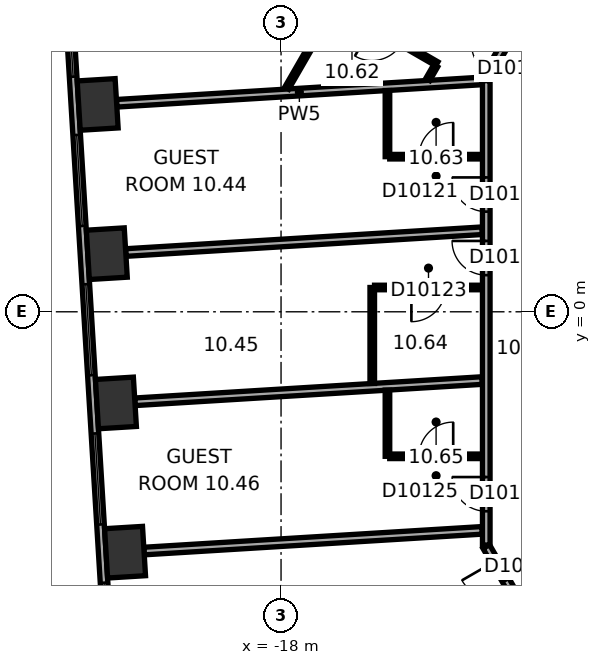
"""IFC4 building model, lengths in metres.
Left out: names, types, materials, properties, quantities, classifications, styles, units other than length and angle.
Written with IfcOpenShell. Run it as: python <this file> out.ifc"""

import sys

from ifc_helpers import new_model, si_unit, direction, frame, frame_2d, origin, origin_2d, place, context, subcontext, project, spatial, rectangle, extrude, element, fill, save


model = new_model("IFC4")
c1 = context("Model", 3, precision=1e-05, world=origin(), true_north=direction((0.0, 1.0)))
c2 = subcontext(c1, "Body", "Model", "MODEL_VIEW")
j1 = project(units=[si_unit("LENGTHUNIT", "METRE"), si_unit("PLANEANGLEUNIT", "RADIAN")], contexts=[c1])
p1 = place(None, origin())
s1 = spatial("IfcSite", under=j1, at=p1, CompositionType="ELEMENT")
p2 = place(p1, origin())
s2 = spatial("IfcBuilding", under=s1, at=p2, CompositionType="ELEMENT")
p3 = place(p2, frame((0.0, 0.0, 53.9)))
s3 = spatial("IfcBuildingStorey", under=s2, at=p3, CompositionType="ELEMENT", Elevation=53.9)
for number, where, z_axis, x_axis in (
    (1, (-22.826, 5.456, 0.0), (0.0, 0.0, 1.0), (0.061, -0.998, 0.0)),
    (2, (-22.585, 1.529, 0.0), (0.0, 0.0, 1.0), (0.061, -0.998, 0.0)),
    (3, (-22.345, -2.399, 0.0), (0.0, 0.0, 1.0), (0.061, -0.998, 0.0)),
    (4, (-22.105, -6.326, 0.0), (0.0, 0.0, 1.0), (0.061, -0.998, 0.0)),
):
    element("IfcColumn", number, at=place(p3, frame(where, z_axis=z_axis, x_axis=x_axis)), inside=s3, PredefinedType="COLUMN", context=c2, shape_type="SweptSolid", body=[
        extrude(rectangle(XDim=1.3, YDim=1.0, at=origin_2d()), origin(), (0.0, 0.0, 1.0), 3.3),
    ])
p4 = place(p3, frame((-23.713, 10.131, 0.0), z_axis=(0.0, 0.0, 1.0), x_axis=(0.061040439785, -0.998135293791, 0.0)))
e5 = element("IfcWall", 5, at=p4, inside=s3, PredefinedType="STANDARD", context=c2, shape_type="SweptSolid", body=[
    extrude(rectangle(XDim=21.246, YDim=0.2, at=frame_2d((10.623, 0.0))), origin(), (0.0, 0.0, 1.0), 3.3),
])
p5 = place(p4, frame((1.553, 0.0, 0.8)))
e6 = element("IfcOpeningElement", 6, at=p5, cuts=e5, PredefinedType="OPENING", context=c2, shape_type="SweptSolid", body=[
    extrude(rectangle(XDim=2.4, YDim=1.7, at=frame_2d((1.2, 0.85))), frame((0.0, 0.11, 0.0), z_axis=(0.0, -1.0, 0.0), x_axis=(1.0, 0.0, 0.0)), (0.0, 0.0, 1.0), 0.22),
])
p6 = place(p4, frame((5.488, 0.0, 0.8)))
e7 = element("IfcOpeningElement", 7, at=p6, cuts=e5, PredefinedType="OPENING", context=c2, shape_type="SweptSolid", body=[
    extrude(rectangle(XDim=2.4, YDim=1.7, at=frame_2d((1.2, 0.85))), frame((0.0, 0.11, 0.0), z_axis=(0.0, -1.0, 0.0), x_axis=(1.0, 0.0, 0.0)), (0.0, 0.0, 1.0), 0.22),
])
p7 = place(p4, frame((9.422, 0.0, 0.8)))
e8 = element("IfcOpeningElement", 8, at=p7, cuts=e5, PredefinedType="OPENING", context=c2, shape_type="SweptSolid", body=[
    extrude(rectangle(XDim=2.4, YDim=1.7, at=frame_2d((1.2, 0.85))), frame((0.0, 0.11, 0.0), z_axis=(0.0, -1.0, 0.0), x_axis=(1.0, 0.0, 0.0)), (0.0, 0.0, 1.0), 0.22),
])
p8 = place(p4, frame((13.357, 0.0, 0.8)))
e9 = element("IfcOpeningElement", 9, at=p8, cuts=e5, PredefinedType="OPENING", context=c2, shape_type="SweptSolid", body=[
    extrude(rectangle(XDim=2.4, YDim=1.7, at=frame_2d((1.2, 0.85))), frame((0.0, 0.11, 0.0), z_axis=(0.0, -1.0, 0.0), x_axis=(1.0, 0.0, 0.0)), (0.0, 0.0, 1.0), 0.22),
])
p9 = place(p4, frame((17.292, 0.0, 0.8)))
e10 = element("IfcOpeningElement", 10, at=p9, cuts=e5, PredefinedType="OPENING", context=c2, shape_type="SweptSolid", body=[
    extrude(rectangle(XDim=2.4, YDim=1.7, at=frame_2d((1.2, 0.85))), frame((0.0, 0.11, 0.0), z_axis=(0.0, -1.0, 0.0), x_axis=(1.0, 0.0, 0.0)), (0.0, 0.0, 1.0), 0.22),
])
p10 = place(p3, frame((-22.327, 5.486, 0.0), z_axis=(0.0, 0.0, 1.0), x_axis=(0.998135194863, 0.061042057435, 0.0)))
e11 = element("IfcWall", 11, at=p10, inside=s3, PredefinedType="PARTITIONING", context=c2, shape_type="SweptSolid", body=[
    extrude(rectangle(XDim=9.635, YDim=0.2, at=frame_2d((4.817, 0.0))), origin(), (0.0, 0.0, 1.0), 3.05),
])
p11 = place(p3, frame((-22.086, 1.559, 0.0), z_axis=(0.0, 0.0, 1.0), x_axis=(0.99813491363, 0.061046655873, 0.0)))
e12 = element("IfcWall", 12, at=p11, inside=s3, PredefinedType="PARTITIONING", context=c2, shape_type="SweptSolid", body=[
    extrude(rectangle(XDim=9.394, YDim=0.2, at=frame_2d((4.697, 0.0))), origin(), (0.0, 0.0, 1.0), 2.6),
])
p12 = place(p3, frame((-21.846, -2.368, 0.0), z_axis=(0.0, 0.0, 1.0), x_axis=(0.998134617584, 0.061051496129, 0.0)))
e13 = element("IfcWall", 13, at=p12, inside=s3, PredefinedType="PARTITIONING", context=c2, shape_type="SweptSolid", body=[
    extrude(rectangle(XDim=9.154, YDim=0.2, at=frame_2d((4.577, 0.0))), origin(), (0.0, 0.0, 1.0), 3.05),
])
p13 = place(p3, frame((-21.606, -6.295, 0.0), z_axis=(0.0, 0.0, 1.0), x_axis=(0.998134305525, 0.061056597794, 0.0)))
e14 = element("IfcWall", 14, at=p13, inside=s3, PredefinedType="PARTITIONING", context=c2, shape_type="SweptSolid", body=[
    extrude(rectangle(XDim=8.913, YDim=0.2, at=frame_2d((4.457, 0.0))), origin(), (0.0, 0.0, 1.0), 2.6),
])
p14 = place(p3, frame((-17.849, 5.885, 0.0), z_axis=(0.0, 0.0, 1.0), x_axis=(0.500034589094, 0.866005432841, 0.0)))
e15 = element("IfcWall", 15, at=p14, inside=s3, PredefinedType="PARTITIONING", context=c2, shape_type="SweptSolid", body=[
    extrude(rectangle(XDim=2.528, YDim=0.12, at=frame_2d((1.264, 0.0))), origin(), (0.0, 0.0, 1.0), 3.05),
])
p15 = place(p3, frame((-16.533, 8.044, 0.0), z_axis=(0.0, 0.0, 1.0), x_axis=(0.86601037836, -0.500026023896, 0.0)))
e16 = element("IfcWall", 16, at=p15, inside=s3, PredefinedType="PARTITIONING", context=c2, shape_type="SweptSolid", body=[
    extrude(rectangle(XDim=3.04, YDim=0.12, at=frame_2d((1.52, 0.0))), origin(), (0.0, 0.0, 1.0), 3.05),
])
p16 = place(p15, frame((1.07, 0.0, 0.0)))
e17 = element("IfcOpeningElement", 17, at=p16, cuts=e16, PredefinedType="OPENING", context=c2, shape_type="SweptSolid", body=[
    extrude(rectangle(XDim=0.9, YDim=2.1, at=frame_2d((0.45, 1.05))), frame((0.0, 0.07, 0.0), z_axis=(0.0, -1.0, 0.0), x_axis=(1.0, 0.0, 0.0)), (0.0, 0.0, 1.0), 0.14),
])
p17 = place(p3, frame((-15.6, -1.886, 0.0), z_axis=(0.0, 0.0, 1.0), x_axis=(0.0, 1.0, 0.0)))
e18 = element("IfcWall", 18, at=p17, inside=s3, PredefinedType="PARTITIONING", context=c2, shape_type="SweptSolid", body=[
    extrude(rectangle(XDim=2.525, YDim=0.12, at=frame_2d((1.263, 0.0))), origin(), (0.0, 0.0, 1.0), 3.05),
])
p18 = place(p3, frame((-15.54, 0.639, 0.0), z_axis=(0.0, 0.0, 1.0), x_axis=(1.0, 0.0, 0.0)))
e19 = element("IfcWall", 19, at=p18, inside=s3, PredefinedType="PARTITIONING", context=c2, shape_type="SweptSolid", body=[
    extrude(rectangle(XDim=2.84, YDim=0.12, at=frame_2d((1.42, 0.0))), origin(), (0.0, 0.0, 1.0), 2.6),
])
p19 = place(p18, frame((0.97, 0.0, 0.0)))
e20 = element("IfcOpeningElement", 20, at=p19, cuts=e19, PredefinedType="OPENING", context=c2, shape_type="SweptSolid", body=[
    extrude(rectangle(XDim=0.9, YDim=2.1, at=frame_2d((0.45, 1.05))), frame((0.0, 0.07, 0.0), z_axis=(0.0, -1.0, 0.0), x_axis=(1.0, 0.0, 0.0)), (0.0, 0.0, 1.0), 0.14),
])
for number, where, z_axis, x_axis in (
    (21, (-15.2, -3.803, 0.0), (0.0, 0.0, 1.0), (0.0, 1.0, 0.0)),
    (22, (-15.2, 4.081, 0.0), (0.0, 0.0, 1.0), (0.0, 1.0, 0.0)),
):
    element("IfcWall", number, at=place(p3, frame(where, z_axis=z_axis, x_axis=x_axis)), inside=s3, PredefinedType="PARTITIONING", context=c2, shape_type="SweptSolid", body=[
        extrude(rectangle(XDim=1.741, YDim=0.12, at=frame_2d((0.871, 0.0))), origin(), (0.0, 0.0, 1.0), 3.05),
    ])
p20 = place(p3, frame((-13.931, 6.472, 0.0), z_axis=(0.0, 0.0, 1.0), x_axis=(-0.499739399214, -0.866175809448, 0.0)))
e23 = element("IfcWall", 23, at=p20, inside=s3, PredefinedType="PARTITIONING", context=c2, shape_type="SweptSolid", body=[
    extrude(rectangle(XDim=0.416, YDim=0.12, at=frame_2d((0.208, 0.0))), origin(), (0.0, 0.0, 1.0), 3.05),
])
p21 = place(p3, frame((-12.7, -3.803, 0.0), z_axis=(0.0, 0.0, 1.0), x_axis=(-1.0, 0.0, 0.0)))
e24 = element("IfcWall", 24, at=p21, inside=s3, PredefinedType="PARTITIONING", context=c2, shape_type="SweptSolid", body=[
    extrude(rectangle(XDim=2.44, YDim=0.12, at=frame_2d((1.22, 0.0))), origin(), (0.0, 0.0, 1.0), 3.05),
])
p22 = place(p21, frame((0.77, 0.0, 0.0)))
e25 = element("IfcOpeningElement", 25, at=p22, cuts=e24, PredefinedType="OPENING", context=c2, shape_type="SweptSolid", body=[
    extrude(rectangle(XDim=0.9, YDim=2.1, at=frame_2d((0.45, 1.05))), frame((0.0, 0.07, 0.0), z_axis=(0.0, -1.0, 0.0), x_axis=(1.0, 0.0, 0.0)), (0.0, 0.0, 1.0), 0.14),
])
p23 = place(p3, frame((-12.7, 4.081, 0.0), z_axis=(0.0, 0.0, 1.0), x_axis=(-1.0, 0.0, 0.0)))
e26 = element("IfcWall", 26, at=p23, inside=s3, PredefinedType="PARTITIONING", context=c2, shape_type="SweptSolid", body=[
    extrude(rectangle(XDim=2.44, YDim=0.12, at=frame_2d((1.22, 0.0))), origin(), (0.0, 0.0, 1.0), 3.05),
])
p24 = place(p23, frame((0.77, 0.0, 0.0)))
e27 = element("IfcOpeningElement", 27, at=p24, cuts=e26, PredefinedType="OPENING", context=c2, shape_type="SweptSolid", body=[
    extrude(rectangle(XDim=0.9, YDim=2.1, at=frame_2d((0.45, 1.05))), frame((0.0, 0.07, 0.0), z_axis=(0.0, -1.0, 0.0), x_axis=(1.0, 0.0, 0.0)), (0.0, 0.0, 1.0), 0.14),
])
p25 = place(p3, frame((-12.6, -6.177, 0.0), z_axis=(0.0, 0.0, 1.0), x_axis=(0.500063520245, -0.865988727248, 0.0)))
e28 = element("IfcWall", 28, at=p25, inside=s3, PredefinedType="PARTITIONING", context=c2, shape_type="SweptSolid", body=[
    extrude(rectangle(XDim=1.9, YDim=0.2, at=frame_2d((0.95, 0.0))), origin(), (0.0, 0.0, 1.0), 3.05),
])
p26 = place(p25, frame((0.45, 0.0, 0.0)))
e29 = element("IfcOpeningElement", 29, at=p26, cuts=e28, PredefinedType="OPENING", context=c2, shape_type="SweptSolid", body=[
    extrude(rectangle(XDim=1.0, YDim=2.1, at=frame_2d((0.5, 1.05))), frame((0.0, 0.11, 0.0), z_axis=(0.0, -1.0, 0.0), x_axis=(1.0, 0.0, 0.0)), (0.0, 0.0, 1.0), 0.22),
])
p27 = place(p3, frame((-12.6, 6.081, 0.0), z_axis=(0.0, 0.0, 1.0), x_axis=(0.0, -1.0, 0.0)))
e30 = element("IfcWall", 30, at=p27, inside=s3, PredefinedType="PARTITIONING", context=c2, shape_type="SweptSolid", body=[
    extrude(rectangle(XDim=12.219, YDim=0.2, at=frame_2d((6.109, 0.0))), origin(), (0.0, 0.0, 1.0), 3.05),
])
p28 = place(p27, frame((2.546, 0.0, 0.0)))
e31 = element("IfcOpeningElement", 31, at=p28, cuts=e30, PredefinedType="OPENING", context=c2, shape_type="SweptSolid", body=[
    extrude(rectangle(XDim=0.9, YDim=2.1, at=frame_2d((0.45, 1.05))), frame((0.0, 0.11, 0.0), z_axis=(0.0, -1.0, 0.0), x_axis=(1.0, 0.0, 0.0)), (0.0, 0.0, 1.0), 0.22),
])
p29 = place(p27, frame((4.217, 0.0, 0.0)))
e32 = element("IfcOpeningElement", 32, at=p29, cuts=e30, PredefinedType="OPENING", context=c2, shape_type="SweptSolid", body=[
    extrude(rectangle(XDim=0.9, YDim=2.1, at=frame_2d((0.45, 1.05))), frame((0.0, 0.11, 0.0), z_axis=(0.0, -1.0, 0.0), x_axis=(1.0, 0.0, 0.0)), (0.0, 0.0, 1.0), 0.22),
])
p30 = place(p27, frame((10.43, 0.0, 0.0)))
e33 = element("IfcOpeningElement", 33, at=p30, cuts=e30, PredefinedType="OPENING", context=c2, shape_type="SweptSolid", body=[
    extrude(rectangle(XDim=0.9, YDim=2.1, at=frame_2d((0.45, 1.05))), frame((0.0, 0.11, 0.0), z_axis=(0.0, -1.0, 0.0), x_axis=(1.0, 0.0, 0.0)), (0.0, 0.0, 1.0), 0.22),
])
p31 = place(p3, frame((-11.65, 7.823, 0.0), z_axis=(0.0, 0.0, 1.0), x_axis=(-0.500063520245, -0.865988727248, 0.0)))
e34 = element("IfcWall", 34, at=p31, inside=s3, PredefinedType="PARTITIONING", context=c2, shape_type="SweptSolid", body=[
    extrude(rectangle(XDim=1.9, YDim=0.2, at=frame_2d((0.95, 0.0))), origin(), (0.0, 0.0, 1.0), 3.05),
])
p32 = place(p31, frame((0.882, 0.0, 0.0)))
e35 = element("IfcOpeningElement", 35, at=p32, cuts=e34, PredefinedType="OPENING", context=c2, shape_type="SweptSolid", body=[
    extrude(rectangle(XDim=0.9, YDim=2.1, at=frame_2d((0.45, 1.05))), frame((0.0, 0.11, 0.0), z_axis=(0.0, -1.0, 0.0), x_axis=(1.0, 0.0, 0.0)), (0.0, 0.0, 1.0), 0.22),
])
p33 = place(p5, origin())
e36 = element("IfcWindow", 36, at=p33, inside=s3, PartitioningType="SINGLE_PANEL", PredefinedType="WINDOW", context=c2, shape_type="SweptSolid", body=[
    extrude(rectangle(XDim=2.4, YDim=1.7, at=frame_2d((1.2, 0.85))), frame((0.0, 0.03, 0.0), z_axis=(0.0, -1.0, 0.0), x_axis=(1.0, 0.0, 0.0)), (0.0, 0.0, 1.0), 0.06),
])
fill(e6, e36)
p34 = place(p6, origin())
e37 = element("IfcWindow", 37, at=p34, inside=s3, PartitioningType="SINGLE_PANEL", PredefinedType="WINDOW", context=c2, shape_type="SweptSolid", body=[
    extrude(rectangle(XDim=2.4, YDim=1.7, at=frame_2d((1.2, 0.85))), frame((0.0, 0.03, 0.0), z_axis=(0.0, -1.0, 0.0), x_axis=(1.0, 0.0, 0.0)), (0.0, 0.0, 1.0), 0.06),
])
fill(e7, e37)
p35 = place(p7, origin())
e38 = element("IfcWindow", 38, at=p35, inside=s3, PartitioningType="SINGLE_PANEL", PredefinedType="WINDOW", context=c2, shape_type="SweptSolid", body=[
    extrude(rectangle(XDim=2.4, YDim=1.7, at=frame_2d((1.2, 0.85))), frame((0.0, 0.03, 0.0), z_axis=(0.0, -1.0, 0.0), x_axis=(1.0, 0.0, 0.0)), (0.0, 0.0, 1.0), 0.06),
])
fill(e8, e38)
p36 = place(p8, origin())
e39 = element("IfcWindow", 39, at=p36, inside=s3, PartitioningType="SINGLE_PANEL", PredefinedType="WINDOW", context=c2, shape_type="SweptSolid", body=[
    extrude(rectangle(XDim=2.4, YDim=1.7, at=frame_2d((1.2, 0.85))), frame((0.0, 0.03, 0.0), z_axis=(0.0, -1.0, 0.0), x_axis=(1.0, 0.0, 0.0)), (0.0, 0.0, 1.0), 0.06),
])
fill(e9, e39)
p37 = place(p9, origin())
e40 = element("IfcWindow", 40, at=p37, inside=s3, PartitioningType="SINGLE_PANEL", PredefinedType="WINDOW", context=c2, shape_type="SweptSolid", body=[
    extrude(rectangle(XDim=2.4, YDim=1.7, at=frame_2d((1.2, 0.85))), frame((0.0, 0.03, 0.0), z_axis=(0.0, -1.0, 0.0), x_axis=(1.0, 0.0, 0.0)), (0.0, 0.0, 1.0), 0.06),
])
fill(e10, e40)
p38 = place(p32, origin())
e41 = element("IfcDoor", 41, at=p38, inside=s3, OperationType="SINGLE_SWING_LEFT", PredefinedType="DOOR", context=c2, shape_type="SweptSolid", body=[
    extrude(rectangle(XDim=0.9, YDim=2.1, at=frame_2d((0.45, 1.05))), frame((0.0, 0.025, 0.0), z_axis=(0.0, -1.0, 0.0), x_axis=(1.0, 0.0, 0.0)), (0.0, 0.0, 1.0), 0.05),
])
fill(e35, e41)
p39 = place(p28, origin())
e42 = element("IfcDoor", 42, at=p39, inside=s3, OperationType="SINGLE_SWING_LEFT", PredefinedType="DOOR", context=c2, shape_type="SweptSolid", body=[
    extrude(rectangle(XDim=0.9, YDim=2.1, at=frame_2d((0.45, 1.05))), frame((0.0, 0.025, 0.0), z_axis=(0.0, -1.0, 0.0), x_axis=(1.0, 0.0, 0.0)), (0.0, 0.0, 1.0), 0.05),
])
fill(e31, e42)
p40 = place(p24, origin())
e43 = element("IfcDoor", 43, at=p40, inside=s3, OperationType="SINGLE_SWING_LEFT", PredefinedType="DOOR", context=c2, shape_type="SweptSolid", body=[
    extrude(rectangle(XDim=0.9, YDim=2.1, at=frame_2d((0.45, 1.05))), frame((0.0, 0.025, 0.0), z_axis=(0.0, -1.0, 0.0), x_axis=(1.0, 0.0, 0.0)), (0.0, 0.0, 1.0), 0.05),
])
fill(e27, e43)
p41 = place(p29, origin())
e44 = element("IfcDoor", 44, at=p41, inside=s3, OperationType="SINGLE_SWING_LEFT", PredefinedType="DOOR", context=c2, shape_type="SweptSolid", body=[
    extrude(rectangle(XDim=0.9, YDim=2.1, at=frame_2d((0.45, 1.05))), frame((0.0, 0.025, 0.0), z_axis=(0.0, -1.0, 0.0), x_axis=(1.0, 0.0, 0.0)), (0.0, 0.0, 1.0), 0.05),
])
fill(e32, e44)
p42 = place(p19, origin())
e45 = element("IfcDoor", 45, at=p42, inside=s3, OperationType="SINGLE_SWING_LEFT", PredefinedType="DOOR", context=c2, shape_type="SweptSolid", body=[
    extrude(rectangle(XDim=0.9, YDim=2.1, at=frame_2d((0.45, 1.05))), frame((0.0, 0.025, 0.0), z_axis=(0.0, -1.0, 0.0), x_axis=(1.0, 0.0, 0.0)), (0.0, 0.0, 1.0), 0.05),
])
fill(e20, e45)
p43 = place(p30, origin())
e46 = element("IfcDoor", 46, at=p43, inside=s3, OperationType="SINGLE_SWING_LEFT", PredefinedType="DOOR", context=c2, shape_type="SweptSolid", body=[
    extrude(rectangle(XDim=0.9, YDim=2.1, at=frame_2d((0.45, 1.05))), frame((0.0, 0.025, 0.0), z_axis=(0.0, -1.0, 0.0), x_axis=(1.0, 0.0, 0.0)), (0.0, 0.0, 1.0), 0.05),
])
fill(e33, e46)
p44 = place(p22, origin())
e47 = element("IfcDoor", 47, at=p44, inside=s3, OperationType="SINGLE_SWING_LEFT", PredefinedType="DOOR", context=c2, shape_type="SweptSolid", body=[
    extrude(rectangle(XDim=0.9, YDim=2.1, at=frame_2d((0.45, 1.05))), frame((0.0, 0.025, 0.0), z_axis=(0.0, -1.0, 0.0), x_axis=(1.0, 0.0, 0.0)), (0.0, 0.0, 1.0), 0.05),
])
fill(e25, e47)
p45 = place(p26, origin())
e48 = element("IfcDoor", 48, at=p45, inside=s3, OperationType="SINGLE_SWING_LEFT", PredefinedType="DOOR", context=c2, shape_type="SweptSolid", body=[
    extrude(rectangle(XDim=1.0, YDim=2.1, at=frame_2d((0.5, 1.05))), frame((0.0, 0.025, 0.0), z_axis=(0.0, -1.0, 0.0), x_axis=(1.0, 0.0, 0.0)), (0.0, 0.0, 1.0), 0.05),
])
fill(e29, e48)
save(model, sys.argv[1])
